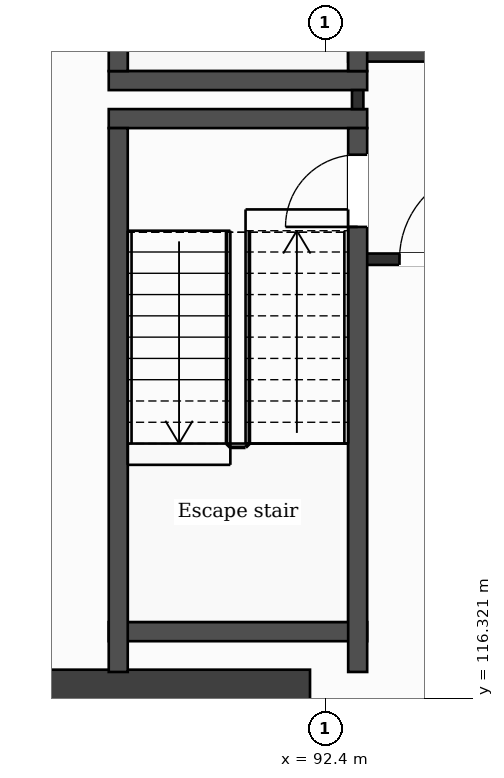
"""IFC4 building model, lengths in metres.
Left out: names, types, materials, properties, quantities, classifications, styles, units other than length and angle.
Written with IfcOpenShell. Run it as: python <this file> out.ifc"""

import sys

from ifc_helpers import new_model, si_unit, direction, frame, frame_2d, origin, place, context, subcontext, project, spatial, rectangle, extrude, element, fill, save


model = new_model("IFC4")
c1 = context("Model", 3, precision=1e-05, world=origin(), true_north=direction((0.0, 1.0)))
c2 = subcontext(c1, "Body", "Model", "MODEL_VIEW")
j1 = project(units=[si_unit("LENGTHUNIT", "METRE"), si_unit("PLANEANGLEUNIT", "RADIAN")], contexts=[c1])
p1 = place(None, origin())
s1 = spatial("IfcSite", under=j1, at=p1, CompositionType="ELEMENT")
p2 = place(p1, origin())
s2 = spatial("IfcBuilding", under=s1, at=p2, CompositionType="ELEMENT")
p3 = place(p2, frame((0.0, 0.0, 270.1)))
s3 = spatial("IfcBuildingStorey", under=s2, at=p3, CompositionType="ELEMENT", Elevation=270.1)
p4 = place(p3, frame((86.07, 110.75, 0.0), z_axis=(0.0, 0.0, 1.0), x_axis=(0.133406218907, 0.991061441464, 0.0)))
e1 = element("IfcWall", 1, at=p4, inside=s3, PredefinedType="SHEAR", context=c2, shape_type="SweptSolid", body=[
    extrude(rectangle(XDim=21.492, YDim=0.7, at=frame_2d((10.746, 0.0))), origin(), (0.0, 0.0, 1.0), 3.7),
])
p5 = place(p3, frame((87.123, 116.35, 0.0), z_axis=(0.0, 0.0, 1.0), x_axis=(1.0, 0.0, 0.0)))
e2 = element("IfcWall", 2, at=p5, inside=s3, PredefinedType="SHEAR", context=c2, shape_type="SweptSolid", body=[
    extrude(rectangle(XDim=5.077, YDim=0.7, at=frame_2d((2.539, 0.0))), origin(), (0.0, 0.0, 1.0), 3.7),
])
p6 = place(p3, frame((89.552, 117.2, 0.0), z_axis=(0.0, 0.0, 1.0), x_axis=(1.0, 0.0, 0.0)))
e3 = element("IfcWall", 3, at=p6, inside=s3, PredefinedType="PARTITIONING", context=c2, shape_type="SweptSolid", body=[
    extrude(rectangle(XDim=3.4, YDim=0.25, at=frame_2d((1.7, 0.0))), origin(), (0.0, 0.0, 1.0), 3.38),
])
p7 = place(p3, frame((92.827, 122.1, 0.0), z_axis=(0.0, 0.0, 1.0), x_axis=(1.0, 0.0, 0.0)))
e4 = element("IfcWall", 4, at=p7, inside=s3, PredefinedType="PARTITIONING", context=c2, shape_type="SweptSolid", body=[
    extrude(rectangle(XDim=2.4, YDim=0.15, at=frame_2d((1.2, 0.0))), origin(), (0.0, 0.0, 1.0), 3.38),
])
p8 = place(p7, frame((0.55, 0.0, 0.0)))
e5 = element("IfcOpeningElement", 5, at=p8, cuts=e4, PredefinedType="OPENING", context=c2, shape_type="SweptSolid", body=[
    extrude(rectangle(XDim=1.2, YDim=2.1, at=frame_2d((0.6, 1.05))), frame((0.0, 0.085, 0.0), z_axis=(0.0, -1.0, 0.0), x_axis=(1.0, 0.0, 0.0)), (0.0, 0.0, 1.0), 0.17),
])
for number, where, z_axis, x_axis in (
    (6, (89.552, 123.95, 0.0), (0.0, 0.0, 1.0), (1.0, 0.0, 0.0)),
    (7, (89.552, 124.45, 0.0), (0.0, 0.0, 1.0), (1.0, 0.0, 0.0)),
):
    element("IfcWall", number, at=place(p3, frame(where, z_axis=z_axis, x_axis=x_axis)), inside=s3, PredefinedType="PARTITIONING", context=c2, shape_type="SweptSolid", body=[
        extrude(rectangle(XDim=3.4, YDim=0.25, at=frame_2d((1.7, 0.0))), origin(), (0.0, 0.0, 1.0), 3.38),
    ])
p9 = place(p3, frame((92.702, 124.8, 0.0), z_axis=(0.0, 0.0, 1.0), x_axis=(1.0, 0.0, 0.0)))
e8 = element("IfcWall", 8, at=p9, inside=s3, PredefinedType="PARTITIONING", context=c2, shape_type="SweptSolid", body=[
    extrude(rectangle(XDim=7.398, YDim=0.2, at=frame_2d((3.699, 0.0))), origin(), (0.0, 0.0, 1.0), 3.38),
])
p10 = place(p9, frame((5.636, 0.0, 0.0)))
e9 = element("IfcOpeningElement", 9, at=p10, cuts=e8, PredefinedType="OPENING", context=c2, shape_type="SweptSolid", body=[
    extrude(rectangle(XDim=1.1, YDim=2.1, at=frame_2d((0.55, 1.05))), frame((0.0, 0.11, 0.0), z_axis=(0.0, -1.0, 0.0), x_axis=(1.0, 0.0, 0.0)), (0.0, 0.0, 1.0), 0.22),
])
for number, where, z_axis, x_axis in (
    (10, (89.677, 116.67, 0.0), (0.0, 0.0, 1.0), (0.0, 1.0, 0.0)),
    (11, (89.677, 124.575, 0.0), (0.0, 0.0, 1.0), (0.0, 1.0, 0.0)),
):
    element("IfcWall", number, at=place(p3, frame(where, z_axis=z_axis, x_axis=x_axis)), inside=s3, PredefinedType="PARTITIONING", context=c2, shape_type="SweptSolid", body=[
        extrude(rectangle(XDim=7.155, YDim=0.25, at=frame_2d((3.578, 0.0))), origin(), (0.0, 0.0, 1.0), 3.38),
    ])
p11 = place(p3, frame((92.827, 124.075, 0.0), z_axis=(0.0, 0.0, 1.0), x_axis=(0.0, 1.0, 0.0)))
e12 = element("IfcWall", 12, at=p11, inside=s3, PredefinedType="PARTITIONING", context=c2, shape_type="SweptSolid", body=[
    extrude(rectangle(XDim=0.25, YDim=0.15, at=frame_2d((0.125, 0.0))), origin(), (0.0, 0.0, 1.0), 3.38),
])
p12 = place(p3, frame((92.827, 116.67, 0.0), z_axis=(0.0, 0.0, 1.0), x_axis=(0.0, 1.0, 0.0)))
e13 = element("IfcWall", 13, at=p12, inside=s3, PredefinedType="PARTITIONING", context=c2, shape_type="SweptSolid", body=[
    extrude(rectangle(XDim=7.155, YDim=0.25, at=frame_2d((3.578, 0.0))), origin(), (0.0, 0.0, 1.0), 3.38),
])
p13 = place(p12, frame((5.855, 0.0, 0.0)))
e14 = element("IfcOpeningElement", 14, at=p13, cuts=e13, PredefinedType="OPENING", context=c2, shape_type="SweptSolid", body=[
    extrude(rectangle(XDim=0.95, YDim=2.1, at=frame_2d((0.475, 1.05))), frame((0.0, 0.135, 0.0), z_axis=(0.0, -1.0, 0.0), x_axis=(1.0, 0.0, 0.0)), (0.0, 0.0, 1.0), 0.27),
])
p14 = place(p3, frame((92.827, 124.575, 0.0), z_axis=(0.0, 0.0, 1.0), x_axis=(0.0, 1.0, 0.0)))
e15 = element("IfcWall", 15, at=p14, inside=s3, PredefinedType="PARTITIONING", context=c2, shape_type="SweptSolid", body=[
    extrude(rectangle(XDim=7.155, YDim=0.25, at=frame_2d((3.578, 0.0))), origin(), (0.0, 0.0, 1.0), 3.38),
])
p15 = place(p14, frame((5.325, 0.0, 0.0)))
e16 = element("IfcOpeningElement", 16, at=p15, cuts=e15, PredefinedType="OPENING", context=c2, shape_type="SweptSolid", body=[
    extrude(rectangle(XDim=1.0, YDim=2.1, at=frame_2d((0.5, 1.05))), frame((0.0, 0.135, 0.0), z_axis=(0.0, -1.0, 0.0), x_axis=(1.0, 0.0, 0.0)), (0.0, 0.0, 1.0), 0.27),
])
p16 = place(p8, origin())
e17 = element("IfcDoor", 17, at=p16, inside=s3, OperationType="SINGLE_SWING_RIGHT", PredefinedType="DOOR", context=c2, shape_type="SweptSolid", body=[
    extrude(rectangle(XDim=1.2, YDim=2.1, at=frame_2d((0.6, 1.05))), frame((0.0, 0.025, 0.0), z_axis=(0.0, -1.0, 0.0), x_axis=(1.0, 0.0, 0.0)), (0.0, 0.0, 1.0), 0.05),
])
fill(e5, e17)
p17 = place(p13, origin())
e18 = element("IfcDoor", 18, at=p17, inside=s3, OperationType="SINGLE_SWING_LEFT", PredefinedType="DOOR", context=c2, shape_type="SweptSolid", body=[
    extrude(rectangle(XDim=0.95, YDim=2.1, at=frame_2d((0.475, 1.05))), frame((0.0, 0.025, 0.0), z_axis=(0.0, -1.0, 0.0), x_axis=(1.0, 0.0, 0.0)), (0.0, 0.0, 1.0), 0.05),
])
fill(e14, e18)
save(model, sys.argv[1])
